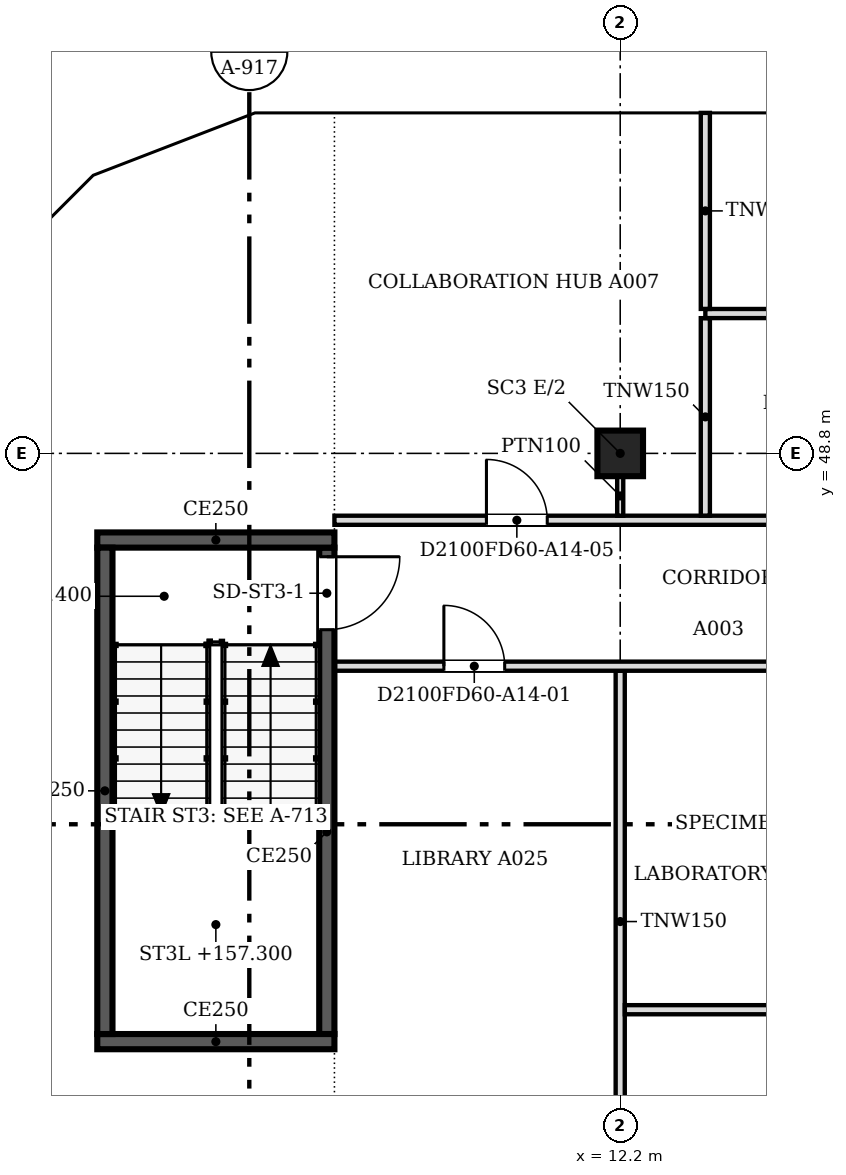
"""IFC4 building model, lengths in metres.
Left out: names, types, materials, properties, quantities, classifications, styles, units other than length and angle.
Written with IfcOpenShell. Run it as: python <this file> out.ifc"""

import sys

from ifc_helpers import new_model, si_unit, direction, frame, frame_2d, origin, origin_2d, place, context, subcontext, project, spatial, polyline, rectangle, outline, extrude, faceted_brep, source, transform, mapped, element, fill, save


model = new_model("IFC4")
c1 = context("Model", 3, precision=1e-05, world=origin(), true_north=direction((0.0, 1.0)))
c2 = subcontext(c1, "Body", "Model", "MODEL_VIEW")
j1 = project(units=[si_unit("LENGTHUNIT", "METRE"), si_unit("PLANEANGLEUNIT", "RADIAN")], contexts=[c1])
p1 = place(None, origin())
s1 = spatial("IfcSite", under=j1, at=p1, CompositionType="ELEMENT")
p2 = place(p1, origin())
s2 = spatial("IfcBuilding", under=s1, at=p2, CompositionType="ELEMENT")
p3 = place(p2, frame((0.0, 0.0, 155.4)))
s3 = spatial("IfcBuildingStorey", under=s2, at=p3, CompositionType="ELEMENT", Elevation=155.4)
p4 = place(p3, frame((12.2, 48.8, 0.0), z_axis=(0.0, 0.0, 1.0), x_axis=(1.0, 0.0, 0.0)))
e1 = element("IfcColumn", 1, at=p4, inside=s3, PredefinedType="COLUMN", context=c2, shape_type="SweptSolid", body=[
    extrude(rectangle(XDim=0.75, YDim=0.75, at=origin_2d()), origin(), (0.0, 0.0, 1.0), 3.6),
])
m1 = source(origin(), c2, "Body", "SweptSolid", [
    extrude(outline(polyline([(6.1, 0.0), (3.05, 3.8), (0.0, 0.0), (6.1, 0.0)])), frame((0.0, 0.25, 0.0), z_axis=(0.0, -1.0, 0.0), x_axis=(1.0, 0.0, 0.0)), (0.0, 0.0, 1.0), 0.5),
])
p5 = place(p3, frame((15.25, 54.65, 0.0), z_axis=(0.0, 0.0, 1.0), x_axis=(-1.0, 0.0, 0.0)))
e2 = element("IfcWall", 2, at=p5, inside=s3, PredefinedType="SOLIDWALL", context=c2, shape_type="MappedRepresentation", body=[
    mapped(m1, transform((0.0, 0.0, 0.0), scale=1.0)),
])
m2 = source(origin(), c2, "Body", "SweptSolid", [
    extrude(outline(polyline([(5.579, 0.25), (3.05, 3.401), (0.521, 0.25), (5.579, 0.25)])), frame((0.0, 0.26, 0.0), z_axis=(0.0, -1.0, 0.0), x_axis=(1.0, 0.0, 0.0)), (0.0, 0.0, 1.0), 0.52),
])
p6 = place(p5, origin())
e3 = element("IfcOpeningElement", 3, at=p6, cuts=e2, PredefinedType="OPENING", context=c2, shape_type="MappedRepresentation", body=[
    mapped(m2, transform((0.0, 0.0, 0.0), scale=1.0)),
])
m3 = source(origin(), c2, "Body", "Brep", [
    faceted_brep([(3.05, -0.25, 3.74), (3.003, -0.25, 3.8), (0.0, -0.25, 0.0), (3.05, -0.25, 0.0), (0.0, 0.25, 0.0), (2.957, 0.25, 3.741), (2.957, 0.25, 0.0), (3.003, 0.0, 3.8)], [[[0, 1, 2, 3]], [[4, 5, 6]], [[7, 1, 0]], [[5, 4, 2, 1, 7]], [[4, 6, 3, 2]], [[3, 6, 5, 7, 0]]]),
])
p7 = place(p3, frame((9.15, 54.65, 0.0), z_axis=(0.0, 0.0, 1.0), x_axis=(-1.0, 0.0, 0.0)))
e4 = element("IfcWall", 4, at=p7, inside=s3, PredefinedType="SOLIDWALL", context=c2, shape_type="MappedRepresentation", body=[
    mapped(m3, transform((0.0, 0.0, 0.0), scale=1.0)),
])
m4 = source(origin(), c2, "Body", "SweptSolid", [
    extrude(outline(polyline([(2.803, 3.144), (0.516, 0.25), (2.803, 0.25), (2.803, 3.144)])), frame((0.0, 0.26, 0.0), z_axis=(0.0, -1.0, 0.0), x_axis=(1.0, 0.0, 0.0)), (0.0, 0.0, 1.0), 0.52),
])
p8 = place(p7, origin())
e5 = element("IfcOpeningElement", 5, at=p8, cuts=e4, PredefinedType="OPENING", context=c2, shape_type="MappedRepresentation", body=[
    mapped(m4, transform((0.0, 0.0, 0.0), scale=1.0)),
])
m5 = source(origin(), c2, "Body", "Brep", [
    faceted_brep([(2.997, -0.25, 0.0), (0.047, -0.25, 3.8), (0.0, -0.25, 3.741), (0.0, -0.25, 0.0), (0.093, 0.25, 3.74), (2.944, 0.25, 0.068), (2.944, 0.25, 0.0), (0.093, 0.25, 0.0), (0.047, 0.0, 3.8), (2.997, 0.0, 0.0)], [[[0, 1, 2, 3]], [[4, 5, 6, 7]], [[5, 4, 8, 1, 0, 9]], [[2, 1, 8]], [[7, 6, 9, 0, 3]], [[7, 3, 2, 8, 4]], [[9, 6, 5]]]),
])
p9 = place(p3, frame((6.19, 54.667, 0.0), z_axis=(0.0, 0.0, 1.0), x_axis=(-0.932990326376, -0.359901446078, 0.0)))
e6 = element("IfcWall", 6, at=p9, inside=s3, PredefinedType="SOLIDWALL", context=c2, shape_type="MappedRepresentation", body=[
    mapped(m5, transform((0.0, 0.0, 0.0), scale=1.0)),
])
m6 = source(origin(), c2, "Body", "SweptSolid", [
    extrude(outline(polyline([(2.487, 0.25), (0.247, 3.135), (0.247, 0.25), (2.487, 0.25)])), frame((0.0, 0.26, 0.0), z_axis=(0.0, -1.0, 0.0), x_axis=(1.0, 0.0, 0.0)), (0.0, 0.0, 1.0), 0.52),
])
p10 = place(p9, origin())
e7 = element("IfcOpeningElement", 7, at=p10, cuts=e6, PredefinedType="OPENING", context=c2, shape_type="MappedRepresentation", body=[
    mapped(m6, transform((0.0, 0.0, 0.0), scale=1.0)),
])
m7 = source(origin(), c2, "Body", "Brep", [
    faceted_brep([(2.997, -0.25, 3.732), (2.944, -0.25, 3.8), (0.0, -0.25, 0.0), (2.997, -0.25, 0.0), (0.053, 0.25, 0.068), (2.891, 0.25, 3.732), (2.891, 0.25, 0.0), (0.053, 0.25, 0.0), (2.944, 0.0, 3.8), (0.0, 0.0, 0.0)], [[[0, 1, 2, 3]], [[4, 5, 6, 7]], [[8, 1, 0]], [[5, 4, 9, 2, 1, 8]], [[7, 6, 3, 2, 9]], [[7, 9, 4]], [[3, 6, 5, 8, 0]]]),
])
p11 = place(p3, frame((3.394, 53.588, 0.0), z_axis=(0.0, 0.0, 1.0), x_axis=(-0.707106781187, -0.707106781187, 0.0)))
e8 = element("IfcWall", 8, at=p11, inside=s3, PredefinedType="SOLIDWALL", context=c2, shape_type="MappedRepresentation", body=[
    mapped(m7, transform((0.0, 0.0, 0.0), scale=1.0)),
])
m8 = source(origin(), c2, "Body", "SweptSolid", [
    extrude(outline(polyline([(2.744, 3.134), (0.51, 0.25), (2.744, 0.25), (2.744, 3.134)])), frame((0.0, 0.26, 0.0), z_axis=(0.0, -1.0, 0.0), x_axis=(1.0, 0.0, 0.0)), (0.0, 0.0, 1.0), 0.52),
])
p12 = place(p11, origin())
e9 = element("IfcOpeningElement", 9, at=p12, cuts=e8, PredefinedType="OPENING", context=c2, shape_type="MappedRepresentation", body=[
    mapped(m8, transform((0.0, 0.0, 0.0), scale=1.0)),
])
p13 = place(p2, frame((0.0, 0.0, 159.2)))
s4 = spatial("IfcBuildingStorey", under=s2, at=p13, CompositionType="ELEMENT", Elevation=159.2)
m9 = source(origin(), c2, "Body", "SweptSolid", [
    extrude(outline(polyline([(3.05, 0.0), (6.1, 3.8), (3.05, 7.6), (0.0, 3.8), (3.05, 0.0)])), frame((0.0, 0.25, 0.0), z_axis=(0.0, -1.0, 0.0), x_axis=(1.0, 0.0, 0.0)), (0.0, 0.0, 1.0), 0.5),
])
p14 = place(p13, frame((18.3, 54.65, -3.8), z_axis=(0.0, 0.0, 1.0), x_axis=(-1.0, 0.0, 0.0)))
e10 = element("IfcWall", 10, at=p14, inside=s4, PredefinedType="SOLIDWALL", context=c2, shape_type="MappedRepresentation", body=[
    mapped(m9, transform((0.0, 0.0, 0.0), scale=1.0)),
])
m10 = source(origin(), c2, "Body", "SweptSolid", [
    extrude(outline(polyline([(3.05, 0.399), (5.78, 3.8), (3.05, 7.201), (0.321, 3.8), (3.05, 0.399)])), frame((0.0, 0.26, 0.0), z_axis=(0.0, -1.0, 0.0), x_axis=(1.0, 0.0, 0.0)), (0.0, 0.0, 1.0), 0.52),
])
p15 = place(p14, origin())
e11 = element("IfcOpeningElement", 11, at=p15, cuts=e10, PredefinedType="OPENING", context=c2, shape_type="MappedRepresentation", body=[
    mapped(m10, transform((0.0, 0.0, 0.0), scale=1.0)),
])
m11 = source(origin(), c2, "Body", "Brep", [
    faceted_brep([(3.05, -0.25, 0.0), (6.053, -0.25, 3.8), (3.05, -0.25, 7.6), (0.0, -0.25, 3.8), (0.0, 0.25, 3.8), (3.05, 0.25, 7.6), (6.007, 0.25, 3.859), (6.007, 0.25, 3.741), (3.05, 0.25, 0.0), (6.053, 0.0, 3.8)], [[[0, 1, 2, 3]], [[4, 5, 6, 7, 8]], [[8, 7, 9, 1, 0]], [[6, 5, 2, 1, 9]], [[5, 4, 3, 2]], [[4, 8, 0, 3]], [[9, 7, 6]]]),
])
p16 = place(p13, frame((12.2, 54.65, -3.8), z_axis=(0.0, 0.0, 1.0), x_axis=(-1.0, 0.0, 0.0)))
e12 = element("IfcWall", 12, at=p16, inside=s4, PredefinedType="SOLIDWALL", context=c2, shape_type="MappedRepresentation", body=[
    mapped(m11, transform((0.0, 0.0, 0.0), scale=1.0)),
])
m12 = source(origin(), c2, "Body", "SweptSolid", [
    extrude(outline(polyline([(3.049, 0.401), (5.735, 3.8), (3.049, 7.199), (0.321, 3.8), (3.049, 0.401)])), frame((0.0, 0.26, 0.0), z_axis=(0.0, -1.0, 0.0), x_axis=(1.0, 0.0, 0.0)), (0.0, 0.0, 1.0), 0.52),
])
p17 = place(p16, origin())
e13 = element("IfcOpeningElement", 13, at=p17, cuts=e12, PredefinedType="OPENING", context=c2, shape_type="MappedRepresentation", body=[
    mapped(m12, transform((0.0, 0.0, 0.0), scale=1.0)),
])
m13 = source(origin(), c2, "Body", "Brep", [
    faceted_brep([(2.95, -0.25, 0.0), (3.003, -0.25, 0.068), (3.003, -0.25, 7.532), (2.95, -0.25, 7.6), (0.0, -0.25, 3.8), (0.047, 0.25, 3.86), (2.898, 0.25, 7.532), (2.898, 0.25, 0.068), (0.047, 0.25, 3.74), (2.95, 0.0, 0.0), (2.95, 0.0, 7.6), (0.0, 0.0, 3.8)], [[[0, 1, 2, 3, 4]], [[5, 6, 7, 8]], [[1, 0, 9]], [[10, 3, 2]], [[6, 5, 11, 4, 3, 10]], [[8, 7, 9, 0, 4, 11]], [[8, 11, 5]], [[1, 9, 7, 6, 10, 2]]]),
])
p18 = place(p13, frame((6.146, 54.65, -3.8), z_axis=(0.0, 0.0, 1.0), x_axis=(-0.932997369089, -0.359883188373, 0.0)))
e14 = element("IfcWall", 14, at=p18, inside=s4, PredefinedType="SOLIDWALL", context=c2, shape_type="MappedRepresentation", body=[
    mapped(m13, transform((0.0, 0.0, 0.0), scale=1.0)),
])
m14 = source(origin(), c2, "Body", "SweptSolid", [
    extrude(outline(polyline([(2.75, 6.935), (0.316, 3.8), (2.75, 0.665), (2.75, 6.935)])), frame((0.0, 0.26, 0.0), z_axis=(0.0, -1.0, 0.0), x_axis=(1.0, 0.0, 0.0)), (0.0, 0.0, 1.0), 0.52),
])
p19 = place(p18, origin())
e15 = element("IfcOpeningElement", 15, at=p19, cuts=e14, PredefinedType="OPENING", context=c2, shape_type="MappedRepresentation", body=[
    mapped(m14, transform((0.0, 0.0, 0.0), scale=1.0)),
])
m15 = source(origin(), c2, "Body", "Brep", [
    faceted_brep([(0.053, -0.25, 0.0), (2.997, -0.25, 3.8), (0.053, -0.25, 7.6), (0.0, -0.25, 7.532), (0.0, -0.25, 0.068), (0.106, 0.25, 7.532), (2.944, 0.25, 3.868), (2.944, 0.25, 3.732), (0.106, 0.25, 0.068), (2.997, 0.0, 3.8), (0.053, 0.0, 0.0), (0.053, 0.0, 7.6)], [[[0, 1, 2, 3, 4]], [[5, 6, 7, 8]], [[8, 7, 9, 1, 0, 10]], [[6, 5, 11, 2, 1, 9]], [[3, 2, 11]], [[10, 0, 4]], [[8, 10, 4, 3, 11, 5]], [[9, 7, 6]]]),
])
p20 = place(p13, frame((3.431, 53.625, -3.8), z_axis=(0.0, 0.0, 1.0), x_axis=(-0.707106781187, -0.707106781187, 0.0)))
e16 = element("IfcWall", 16, at=p20, inside=s4, PredefinedType="SOLIDWALL", context=c2, shape_type="MappedRepresentation", body=[
    mapped(m15, transform((0.0, 0.0, 0.0), scale=1.0)),
])
m16 = source(origin(), c2, "Body", "SweptSolid", [
    extrude(outline(polyline([(0.253, 0.667), (2.681, 3.8), (0.253, 6.934), (0.253, 0.667)])), frame((0.0, 0.26, 0.0), z_axis=(0.0, -1.0, 0.0), x_axis=(1.0, 0.0, 0.0)), (0.0, 0.0, 1.0), 0.52),
])
p21 = place(p20, origin())
e17 = element("IfcOpeningElement", 17, at=p21, cuts=e16, PredefinedType="OPENING", context=c2, shape_type="MappedRepresentation", body=[
    mapped(m16, transform((0.0, 0.0, 0.0), scale=1.0)),
])
p22 = place(p3, frame((7.5, 39.125, 0.0), z_axis=(0.0, 0.0, 1.0), x_axis=(-1.0, 0.0, 0.0)))
e18 = element("IfcWall", 18, at=p22, inside=s3, PredefinedType="SOLIDWALL", context=c2, shape_type="SweptSolid", body=[
    extrude(rectangle(XDim=3.9, YDim=0.25, at=frame_2d((1.95, 0.0))), origin(), (0.0, 0.0, 1.0), 3.8),
])
p23 = place(p3, frame((3.725, 39.25, 0.0), z_axis=(0.0, 0.0, 1.0), x_axis=(0.0, 1.0, 0.0)))
e19 = element("IfcWall", 19, at=p23, inside=s3, PredefinedType="SOLIDWALL", context=c2, shape_type="SweptSolid", body=[
    extrude(rectangle(XDim=8.0, YDim=0.25, at=frame_2d((4.0, 0.0))), origin(), (0.0, 0.0, 1.0), 3.8),
])
p24 = place(p3, frame((3.6, 47.375, 0.0), z_axis=(0.0, 0.0, 1.0), x_axis=(1.0, 0.0, 0.0)))
e20 = element("IfcWall", 20, at=p24, inside=s3, PredefinedType="SOLIDWALL", context=c2, shape_type="SweptSolid", body=[
    extrude(rectangle(XDim=3.9, YDim=0.25, at=frame_2d((1.95, 0.0))), origin(), (0.0, 0.0, 1.0), 3.8),
])
p25 = place(p3, frame((7.375, 47.25, 0.0), z_axis=(0.0, 0.0, 1.0), x_axis=(0.0, -1.0, 0.0)))
e21 = element("IfcWall", 21, at=p25, inside=s3, PredefinedType="SOLIDWALL", context=c2, shape_type="SweptSolid", body=[
    extrude(rectangle(XDim=8.0, YDim=0.25, at=frame_2d((4.0, 0.0))), origin(), (0.0, 0.0, 1.0), 3.8),
])
m17 = source(origin(), c2, "Body", "SweptSolid", [
    extrude(rectangle(XDim=1.2, YDim=2.1, at=frame_2d((0.6, 1.05))), frame((0.0, 0.135, 0.0), z_axis=(0.0, -1.0, 0.0), x_axis=(1.0, 0.0, 0.0)), (0.0, 0.0, 1.0), 0.27),
])
p26 = place(p25, frame((0.15, 0.0, 0.0)))
e22 = element("IfcOpeningElement", 22, at=p26, cuts=e21, PredefinedType="OPENING", context=c2, shape_type="MappedRepresentation", body=[
    mapped(m17, transform((0.0, 0.0, 0.0), scale=1.0)),
])
p27 = place(p3, frame((12.2, 36.976, 0.0), z_axis=(0.0, 0.0, 1.0), x_axis=(0.0, 1.0, 0.0)))
e23 = element("IfcWall", 23, at=p27, inside=s3, PredefinedType="PARTITIONING", context=c2, shape_type="SweptSolid", body=[
    extrude(rectangle(XDim=8.248, YDim=0.15, at=frame_2d((4.124, 0.0))), origin(), (0.0, 0.0, 1.0), 3.067),
])
p28 = place(p3, frame((12.276, 39.65, 0.0), z_axis=(0.0, 0.0, 1.0), x_axis=(1.0, 0.0, 0.0)))
e24 = element("IfcWall", 24, at=p28, inside=s3, PredefinedType="PARTITIONING", context=c2, shape_type="SweptSolid", body=[
    extrude(rectangle(XDim=15.748, YDim=0.15, at=frame_2d((7.874, 0.0))), origin(), (0.0, 0.0, 1.0), 3.067),
])
p29 = place(p3, frame((28.024, 45.3, 0.0), z_axis=(0.0, 0.0, 1.0), x_axis=(-1.0, 0.0, 0.0)))
e25 = element("IfcWall", 25, at=p29, inside=s3, PredefinedType="PARTITIONING", context=c2, shape_type="SweptSolid", body=[
    extrude(rectangle(XDim=20.524, YDim=0.15, at=frame_2d((10.262, 0.0))), origin(), (0.0, 0.0, 1.0), 3.067),
])
m18 = source(origin(), c2, "Body", "SweptSolid", [
    extrude(rectangle(XDim=1.0, YDim=2.1, at=frame_2d((0.5, 1.05))), frame((0.0, 0.085, 0.0), z_axis=(0.0, -1.0, 0.0), x_axis=(1.0, 0.0, 0.0)), (0.0, 0.0, 1.0), 0.17),
])
p30 = place(p29, frame((17.724, 0.0, 0.0)))
e26 = element("IfcOpeningElement", 26, at=p30, cuts=e25, PredefinedType="OPENING", context=c2, shape_type="MappedRepresentation", body=[
    mapped(m18, transform((0.0, 0.0, 0.0), scale=1.0)),
])
p31 = place(p3, frame((7.5, 47.7, 0.0), z_axis=(0.0, 0.0, 1.0), x_axis=(1.0, 0.0, 0.0)))
e27 = element("IfcWall", 27, at=p31, inside=s3, PredefinedType="PARTITIONING", context=c2, shape_type="SweptSolid", body=[
    extrude(rectangle(XDim=20.6, YDim=0.15, at=frame_2d((10.3, 0.0))), origin(), (0.0, 0.0, 1.0), 3.067),
])
p32 = place(p31, frame((2.5, 0.0, 0.0)))
e28 = element("IfcOpeningElement", 28, at=p32, cuts=e27, PredefinedType="OPENING", context=c2, shape_type="MappedRepresentation", body=[
    mapped(m18, transform((0.0, 0.0, 0.0), scale=1.0)),
])
p33 = place(p31, frame((12.8, 0.0, 0.0)))
e29 = element("IfcOpeningElement", 29, at=p33, cuts=e27, PredefinedType="OPENING", context=c2, shape_type="MappedRepresentation", body=[
    mapped(m18, transform((0.0, 0.0, 0.0), scale=1.0)),
])
p34 = place(p3, frame((13.6, 47.776, 0.0), z_axis=(0.0, 0.0, 1.0), x_axis=(0.0, 1.0, 0.0)))
e30 = element("IfcWall", 30, at=p34, inside=s3, PredefinedType="PARTITIONING", context=c2, shape_type="SweptSolid", body=[
    extrude(rectangle(XDim=3.248, YDim=0.15, at=frame_2d((1.624, 0.0))), origin(), (0.0, 0.0, 1.0), 3.067),
])
p35 = place(p3, frame((12.2, 48.425, 0.0), z_axis=(0.0, 0.0, 1.0), x_axis=(0.0, -1.0, 0.0)))
e31 = element("IfcWall", 31, at=p35, inside=s3, PredefinedType="PARTITIONING", context=c2, shape_type="SweptSolid", body=[
    extrude(rectangle(XDim=0.65, YDim=0.1, at=frame_2d((0.325, 0.0))), origin(), (0.0, 0.0, 1.0), 3.067),
])
p36 = place(p3, frame((13.6, 51.1, 0.0), z_axis=(0.0, 0.0, 1.0), x_axis=(1.0, 0.0, 0.0)))
e32 = element("IfcWall", 32, at=p36, inside=s3, PredefinedType="PARTITIONING", context=c2, shape_type="SweptSolid", body=[
    extrude(rectangle(XDim=14.424, YDim=0.15, at=frame_2d((7.212, 0.0))), origin(), (0.0, 0.0, 1.0), 3.067),
])
m19 = source(origin(), c2, "Body", "SweptSolid", [
    extrude(rectangle(XDim=0.9, YDim=2.1, at=frame_2d((0.45, 1.05))), frame((0.0, 0.085, 0.0), z_axis=(0.0, -1.0, 0.0), x_axis=(1.0, 0.0, 0.0)), (0.0, 0.0, 1.0), 0.17),
])
p37 = place(p36, frame((3.1, 0.0, 0.0)))
e33 = element("IfcOpeningElement", 33, at=p37, cuts=e32, PredefinedType="OPENING", context=c2, shape_type="MappedRepresentation", body=[
    mapped(m19, transform((0.0, 0.0, 0.0), scale=1.0)),
])
p38 = place(p36, frame((10.305, 0.0, 0.0)))
e34 = element("IfcOpeningElement", 34, at=p38, cuts=e32, PredefinedType="OPENING", context=c2, shape_type="MappedRepresentation", body=[
    mapped(m19, transform((0.0, 0.0, 0.0), scale=1.0)),
])
p39 = place(p3, frame((13.6, 51.176, 0.0), z_axis=(0.0, 0.0, 1.0), x_axis=(0.0, 1.0, 0.0)))
e35 = element("IfcWall", 35, at=p39, inside=s3, PredefinedType="PARTITIONING", context=c2, shape_type="SweptSolid", body=[
    extrude(rectangle(XDim=3.224, YDim=0.15, at=frame_2d((1.612, 0.0))), origin(), (0.0, 0.0, 1.0), 3.067),
])
m20 = source(origin(), c2, "Body", "SweptSolid", [
    extrude(rectangle(XDim=1.2, YDim=2.1, at=frame_2d((0.6, 1.05))), frame((0.0, 0.025, 0.0), z_axis=(0.0, -1.0, 0.0), x_axis=(1.0, 0.0, 0.0)), (0.0, 0.0, 1.0), 0.05),
])
p40 = place(p26, origin())
e36 = element("IfcDoor", 36, at=p40, inside=s3, OperationType="SINGLE_SWING_LEFT", PredefinedType="DOOR", context=c2, shape_type="MappedRepresentation", body=[
    mapped(m20, transform((0.0, 0.0, 0.0), scale=1.0)),
])
fill(e22, e36)
m21 = source(origin(), c2, "Body", "SweptSolid", [
    extrude(rectangle(XDim=1.0, YDim=2.1, at=frame_2d((0.5, 1.05))), frame((0.0, 0.025, 0.0), z_axis=(0.0, -1.0, 0.0), x_axis=(1.0, 0.0, 0.0)), (0.0, 0.0, 1.0), 0.05),
])
p41 = place(p30, origin())
e37 = element("IfcDoor", 37, at=p41, inside=s3, OperationType="SINGLE_SWING_RIGHT", PredefinedType="DOOR", context=c2, shape_type="MappedRepresentation", body=[
    mapped(m21, transform((0.0, 0.0, 0.0), scale=1.0)),
])
fill(e26, e37)
p42 = place(p32, origin())
e38 = element("IfcDoor", 38, at=p42, inside=s3, OperationType="SINGLE_SWING_LEFT", PredefinedType="DOOR", context=c2, shape_type="MappedRepresentation", body=[
    mapped(m21, transform((0.0, 0.0, 0.0), scale=1.0)),
])
fill(e28, e38)
save(model, sys.argv[1])
